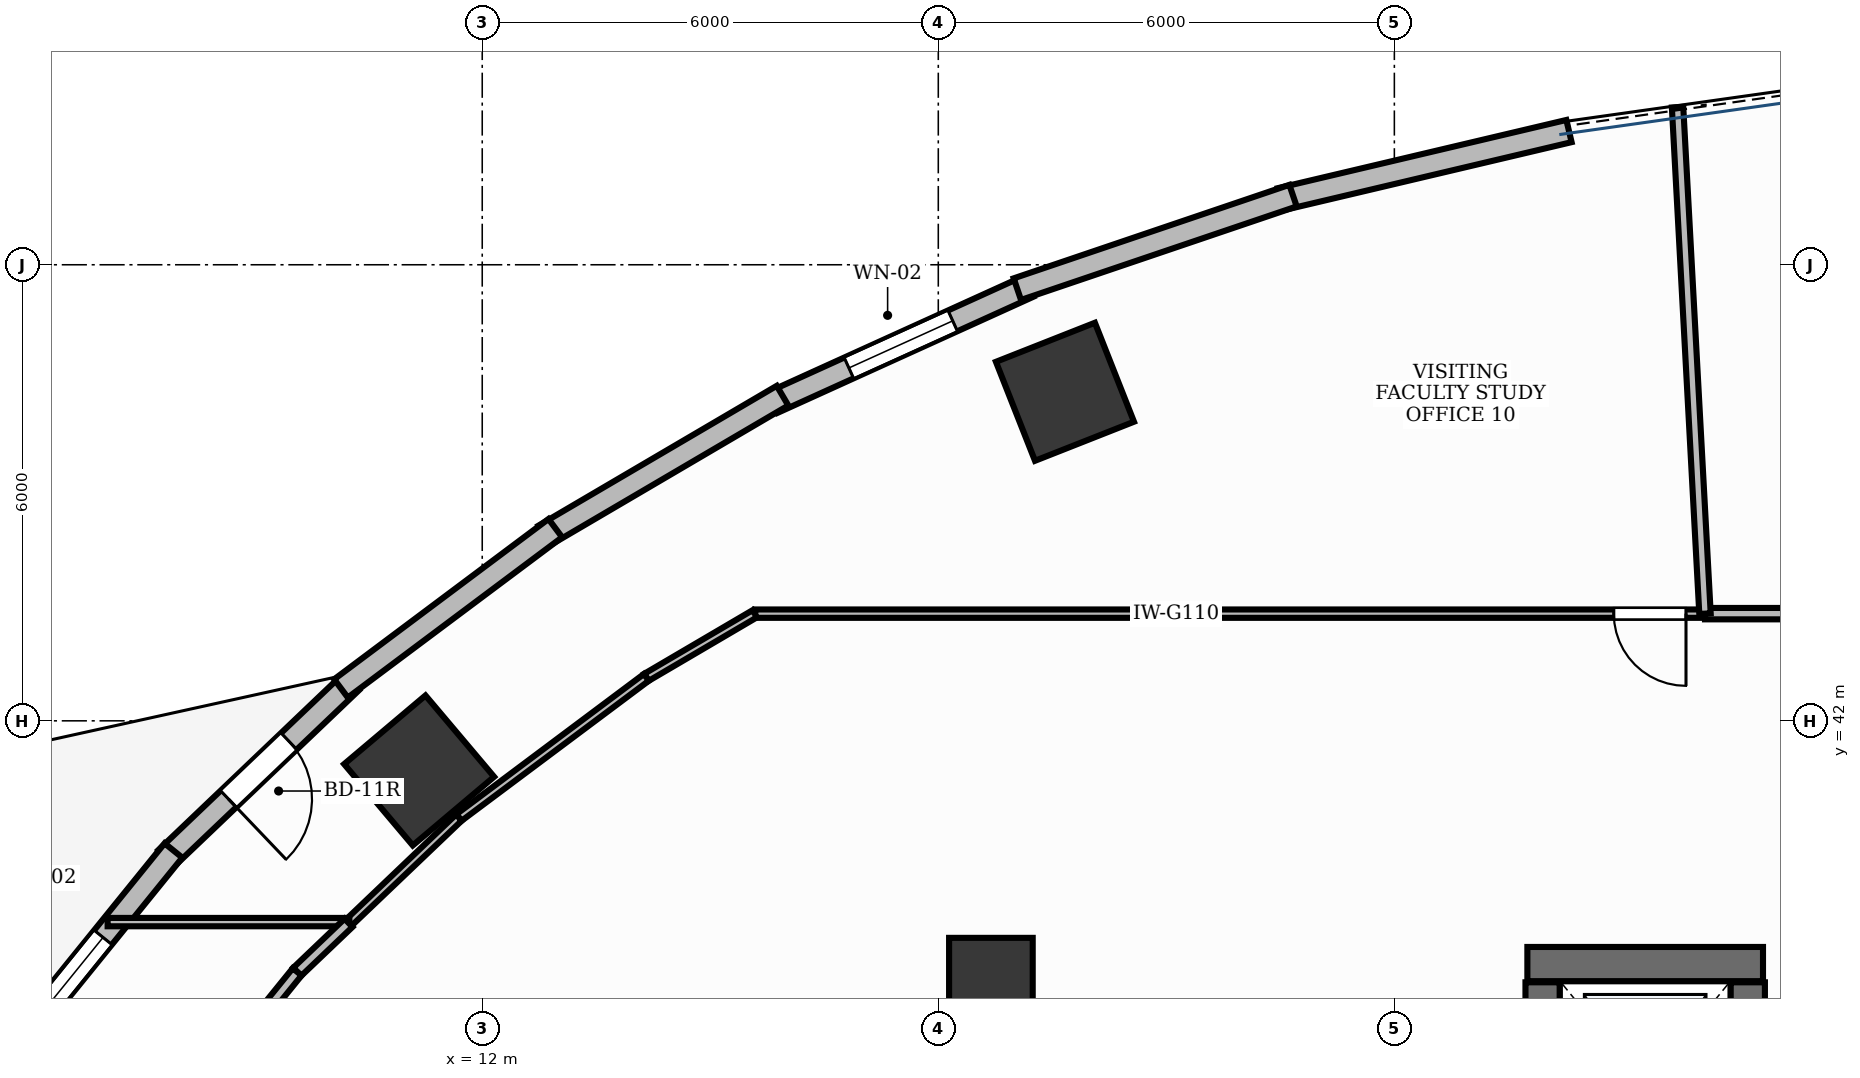
"""IFC4 building model, lengths in metres.
Left out: names, types, materials, properties, quantities, classifications, styles, units other than length and angle.
Written with IfcOpenShell. Run it as: python <this file> out.ifc"""

import sys

from ifc_helpers import new_model, si_unit, direction, frame, frame_2d, origin, origin_2d, place, context, subcontext, project, spatial, rectangle, extrude, element, fill, save


model = new_model("IFC4")
c1 = context("Model", 3, precision=1e-05, world=origin(), true_north=direction((0.0, 1.0)))
c2 = subcontext(c1, "Body", "Model", "MODEL_VIEW")
j1 = project(units=[si_unit("LENGTHUNIT", "METRE"), si_unit("PLANEANGLEUNIT", "RADIAN")], contexts=[c1])
p1 = place(None, origin())
s1 = spatial("IfcSite", under=j1, at=p1, CompositionType="ELEMENT")
p2 = place(p1, origin())
s2 = spatial("IfcBuilding", under=s1, at=p2, CompositionType="ELEMENT")
p3 = place(p2, frame((0.0, 0.0, 46.8)))
s3 = spatial("IfcBuildingStorey", under=s2, at=p3, CompositionType="ELEMENT", Elevation=46.8)
p4 = place(p3, frame((25.75, 38.8, 0.0), z_axis=(0.0, 0.0, 1.0), x_axis=(1.0, 0.0, 0.0)))
e1 = element("IfcWall", 1, at=p4, inside=s3, PredefinedType="SHEAR", context=c2, shape_type="SweptSolid", body=[
    extrude(rectangle(XDim=3.1, YDim=0.45, at=frame_2d((1.55, 0.0))), origin(), (0.0, 0.0, 1.0), 3.9),
])
for number, where, z_axis, x_axis in (
    (2, (25.95, 35.86, 0.0), (0.0, 0.0, 1.0), (0.0, 1.0, 0.0)),
    (3, (28.65, 35.86, 0.0), (0.0, 0.0, 1.0), (0.0, 1.0, 0.0)),
):
    element("IfcWall", number, at=place(p3, frame(where, z_axis=z_axis, x_axis=x_axis)), inside=s3, PredefinedType="SHEAR", context=c2, shape_type="SweptSolid", body=[
        extrude(rectangle(XDim=2.7, YDim=0.45, at=frame_2d((1.35, 0.0))), origin(), (0.0, 0.0, 1.0), 3.9),
    ])
for number, where, z_axis, x_axis in (
    (4, (19.667, 46.329, -0.0), (0.0, 0.0, 1.0), (0.93, 0.367, 0.0)),
    (5, (11.17, 41.347, -0.0), (0.0, 0.0, 1.0), (0.764, 0.645, 0.0)),
):
    element("IfcColumn", number, at=place(p3, frame(where, z_axis=z_axis, x_axis=x_axis)), inside=s3, PredefinedType="COLUMN", context=c2, shape_type="SweptSolid", body=[
        extrude(rectangle(XDim=1.4, YDim=1.4, at=origin_2d()), origin(), (0.0, 0.0, 1.0), 3.901),
    ])
p5 = place(p3, frame((18.692, 38.595, -0.0), z_axis=(0.0, 0.0, 1.0), x_axis=(1.0, 0.0, 0.0)))
e6 = element("IfcColumn", 6, at=p5, inside=s3, PredefinedType="COLUMN", context=c2, shape_type="SweptSolid", body=[
    extrude(rectangle(XDim=1.1, YDim=1.1, at=origin_2d()), origin(), (0.0, 0.0, 1.0), 3.901),
])
p6 = place(p3, frame((19.191, 47.717, 0.0), z_axis=(0.0, 0.0, 1.0), x_axis=(-0.910608120407, -0.413270917254, 0.0)))
e7 = element("IfcWall", 7, at=p6, inside=s3, PredefinedType="STANDARD", context=c2, shape_type="SweptSolid", body=[
    extrude(rectangle(XDim=3.7, YDim=0.3, at=frame_2d((1.85, 0.0))), origin(), (0.0, 0.0, 1.0), 3.9),
])
p7 = place(p6, frame((1.1, 0.0, 0.95)))
e8 = element("IfcOpeningElement", 8, at=p7, cuts=e7, PredefinedType="OPENING", context=c2, shape_type="SweptSolid", body=[
    extrude(rectangle(XDim=1.5, YDim=1.8, at=frame_2d((0.75, 0.9))), frame((0.0, 0.165, 0.0), z_axis=(0.0, -1.0, 0.0), x_axis=(1.0, 0.0, 0.0)), (0.0, 0.0, 1.0), 0.33),
])
p8 = place(p3, frame((10.276, 42.512, 0.0), z_axis=(0.0, 0.0, 1.0), x_axis=(-0.723678516117, -0.690137236578, 0.0)))
e9 = element("IfcWall", 9, at=p8, inside=s3, PredefinedType="STANDARD", context=c2, shape_type="SweptSolid", body=[
    extrude(rectangle(XDim=3.363, YDim=0.3, at=frame_2d((1.681, 0.0))), origin(), (0.0, 0.0, 1.0), 3.9),
])
p9 = place(p8, frame((1.131, 0.0, 0.0)))
e10 = element("IfcOpeningElement", 10, at=p9, cuts=e9, PredefinedType="OPENING", context=c2, shape_type="SweptSolid", body=[
    extrude(rectangle(XDim=1.1, YDim=2.15, at=frame_2d((0.55, 1.075))), frame((0.0, 0.165, 0.0), z_axis=(0.0, -1.0, 0.0), x_axis=(1.0, 0.0, 0.0)), (0.0, 0.0, 1.0), 0.33),
])
p10 = place(p3, frame((7.938, 40.294, 0.0), z_axis=(0.0, 0.0, 1.0), x_axis=(-0.629295540187, -0.777166084631, 0.0)))
e11 = element("IfcWall", 11, at=p10, inside=s3, PredefinedType="STANDARD", context=c2, shape_type="SweptSolid", body=[
    extrude(rectangle(XDim=3.248, YDim=0.3, at=frame_2d((1.624, 0.0))), origin(), (0.0, 0.0, 1.0), 3.9),
])
p11 = place(p10, frame((1.472, 0.0, 0.95)))
e12 = element("IfcOpeningElement", 12, at=p11, cuts=e11, PredefinedType="OPENING", context=c2, shape_type="SweptSolid", body=[
    extrude(rectangle(XDim=1.5, YDim=1.8, at=frame_2d((0.75, 0.9))), frame((0.0, 0.165, 0.0), z_axis=(0.0, -1.0, 0.0), x_axis=(1.0, 0.0, 0.0)), (0.0, 0.0, 1.0), 0.33),
])
p12 = place(p3, frame((26.297, 49.759, 0.0), z_axis=(0.0, 0.0, 1.0), x_axis=(-0.973197600754, -0.229970497863, 0.0)))
e13 = element("IfcWall", 13, at=p12, inside=s3, PredefinedType="STANDARD", context=c2, shape_type="SweptSolid", body=[
    extrude(rectangle(XDim=3.901, YDim=0.3, at=frame_2d((1.951, 0.0))), origin(), (0.0, 0.0, 1.0), 3.9),
])
p13 = place(p3, frame((22.667, 48.909, 0.0), z_axis=(0.0, 0.0, 1.0), x_axis=(-0.94702579403, -0.321157508773, 0.0)))
e14 = element("IfcWall", 14, at=p13, inside=s3, PredefinedType="STANDARD", context=c2, shape_type="SweptSolid", body=[
    extrude(rectangle(XDim=3.83, YDim=0.3, at=frame_2d((1.915, 0.0))), origin(), (0.0, 0.0, 1.0), 3.47),
])
p14 = place(p3, frame((15.951, 46.278, 0.0), z_axis=(0.0, 0.0, 1.0), x_axis=(-0.8624654944, -0.506115867139, 0.0)))
e15 = element("IfcWall", 15, at=p14, inside=s3, PredefinedType="STANDARD", context=c2, shape_type="SweptSolid", body=[
    extrude(rectangle(XDim=3.635, YDim=0.3, at=frame_2d((1.818, 0.0))), origin(), (0.0, 0.0, 1.0), 3.9),
])
p15 = place(p3, frame((12.961, 44.535, 0.0), z_axis=(0.0, 0.0, 1.0), x_axis=(-0.800823020995, -0.598901067827, 0.0)))
e16 = element("IfcWall", 16, at=p15, inside=s3, PredefinedType="STANDARD", context=c2, shape_type="SweptSolid", body=[
    extrude(rectangle(XDim=3.521, YDim=0.3, at=frame_2d((1.76, 0.0))), origin(), (0.0, 0.0, 1.0), 3.9),
])
p16 = place(p3, frame((35.238, 43.41, 0.0), z_axis=(0.0, 0.0, 1.0), x_axis=(-1.0, 0.0, 0.0)))
e17 = element("IfcWall", 17, at=p16, inside=s3, PredefinedType="PARTITIONING", context=c2, shape_type="SweptSolid", body=[
    extrude(rectangle(XDim=7.151, YDim=0.15, at=frame_2d((3.575, 0.0))), origin(), (0.0, 0.0, 1.0), 2.91),
])
p17 = place(p16, frame((0.24, 0.0, 0.0)))
e18 = element("IfcOpeningElement", 18, at=p17, cuts=e17, PredefinedType="OPENING", context=c2, shape_type="SweptSolid", body=[
    extrude(rectangle(XDim=0.95, YDim=2.15, at=frame_2d((0.475, 1.075))), frame((0.0, 0.09, 0.0), z_axis=(0.0, -1.0, 0.0), x_axis=(1.0, 0.0, 0.0)), (0.0, 0.0, 1.0), 0.18),
])
p18 = place(p3, frame((28.077, 43.41, 0.0), z_axis=(0.0, 0.0, 1.0), x_axis=(-1.0, 0.0, 0.0)))
e19 = element("IfcWall", 19, at=p18, inside=s3, PredefinedType="MOVABLE", context=c2, shape_type="SweptSolid", body=[
    extrude(rectangle(XDim=12.486, YDim=0.11, at=frame_2d((6.243, 0.0))), origin(), (0.0, 0.0, 1.0), 2.91),
])
p19 = place(p18, frame((0.24, 0.0, 0.0)))
e20 = element("IfcOpeningElement", 20, at=p19, cuts=e19, PredefinedType="OPENING", context=c2, shape_type="SweptSolid", body=[
    extrude(rectangle(XDim=0.95, YDim=2.15, at=frame_2d((0.475, 1.075))), frame((0.0, 0.07, 0.0), z_axis=(0.0, -1.0, 0.0), x_axis=(1.0, 0.0, 0.0)), (0.0, 0.0, 1.0), 0.14),
])
p20 = place(p3, frame((28.087, 43.41, 0.0), z_axis=(0.0, 0.0, 1.0), x_axis=(-0.054075825804, 0.998536832102, 0.0)))
e21 = element("IfcWall", 21, at=p20, inside=s3, PredefinedType="PARTITIONING", context=c2, shape_type="SweptSolid", body=[
    extrude(rectangle(XDim=6.673, YDim=0.15, at=frame_2d((3.336, 0.0))), origin(), (0.0, 0.0, 1.0), 2.91),
])
p21 = place(p3, frame((15.586, 43.409, 0.0), z_axis=(0.0, 0.0, 1.0), x_axis=(-0.862446636904, -0.506148000582, 0.0)))
e22 = element("IfcWall", 22, at=p21, inside=s3, PredefinedType="MOVABLE", context=c2, shape_type="SweptSolid", body=[
    extrude(rectangle(XDim=1.652, YDim=0.11, at=frame_2d((0.826, 0.0))), origin(), (0.0, 0.0, 1.0), 2.91),
])
p22 = place(p3, frame((14.16, 42.572, 0.0), z_axis=(0.0, 0.0, 1.0), x_axis=(-0.800808090092, -0.598921032227, 0.0)))
e23 = element("IfcWall", 23, at=p22, inside=s3, PredefinedType="MOVABLE", context=c2, shape_type="SweptSolid", body=[
    extrude(rectangle(XDim=3.079, YDim=0.11, at=frame_2d((1.54, 0.0))), origin(), (0.0, 0.0, 1.0), 2.91),
])
p23 = place(p3, frame((11.693, 40.727, 0.0), z_axis=(0.0, 0.0, 1.0), x_axis=(-0.723636479822, -0.690181313185, 0.0)))
e24 = element("IfcWall", 24, at=p23, inside=s3, PredefinedType="MOVABLE", context=c2, shape_type="SweptSolid", body=[
    extrude(rectangle(XDim=1.992, YDim=0.11, at=frame_2d((0.996, 0.0))), origin(), (0.0, 0.0, 1.0), 2.91),
])
p24 = place(p3, frame((10.252, 39.352, 0.0), z_axis=(0.0, 0.0, 1.0), x_axis=(-1.0, 0.0, 0.0)))
e25 = element("IfcWall", 25, at=p24, inside=s3, PredefinedType="MOVABLE", context=c2, shape_type="SweptSolid", body=[
    extrude(rectangle(XDim=3.18, YDim=0.11, at=frame_2d((1.59, 0.0))), origin(), (0.0, 0.0, 1.0), 2.91),
])
p25 = place(p3, frame((10.241, 39.342, 0.0), z_axis=(0.0, 0.0, 1.0), x_axis=(-0.723783132033, -0.690027519585, 0.0)))
e26 = element("IfcWall", 26, at=p25, inside=s3, PredefinedType="PARTITIONING", context=c2, shape_type="SweptSolid", body=[
    extrude(rectangle(XDim=0.933, YDim=0.15, at=frame_2d((0.467, 0.0))), origin(), (0.0, 0.0, 1.0), 2.91),
])
p26 = place(p3, frame((9.565, 38.697, 0.0), z_axis=(0.0, 0.0, 1.0), x_axis=(-0.629270515505, -0.777186347227, 0.0)))
e27 = element("IfcWall", 27, at=p26, inside=s3, PredefinedType="PARTITIONING", context=c2, shape_type="SweptSolid", body=[
    extrude(rectangle(XDim=2.817, YDim=0.15, at=frame_2d((1.409, 0.0))), origin(), (0.0, 0.0, 1.0), 2.91),
])
p27 = place(p7, origin())
e28 = element("IfcWindow", 28, at=p27, inside=s3, PartitioningType="DOUBLE_PANEL_VERTICAL", PredefinedType="WINDOW", context=c2, shape_type="SweptSolid", body=[
    extrude(rectangle(XDim=1.5, YDim=1.8, at=frame_2d((0.75, 0.9))), frame((0.0, 0.03, 0.0), z_axis=(0.0, -1.0, 0.0), x_axis=(1.0, 0.0, 0.0)), (0.0, 0.0, 1.0), 0.06),
])
fill(e8, e28)
p28 = place(p9, origin())
e29 = element("IfcDoor", 29, at=p28, inside=s3, OperationType="SINGLE_SWING_RIGHT", PredefinedType="DOOR", context=c2, shape_type="SweptSolid", body=[
    extrude(rectangle(XDim=1.1, YDim=2.15, at=frame_2d((0.55, 1.075))), frame((0.0, 0.025, 0.0), z_axis=(0.0, -1.0, 0.0), x_axis=(1.0, 0.0, 0.0)), (0.0, 0.0, 1.0), 0.05),
])
fill(e10, e29)
p29 = place(p11, origin())
e30 = element("IfcWindow", 30, at=p29, inside=s3, PartitioningType="DOUBLE_PANEL_VERTICAL", PredefinedType="WINDOW", context=c2, shape_type="SweptSolid", body=[
    extrude(rectangle(XDim=1.5, YDim=1.8, at=frame_2d((0.75, 0.9))), frame((0.0, 0.03, 0.0), z_axis=(0.0, -1.0, 0.0), x_axis=(1.0, 0.0, 0.0)), (0.0, 0.0, 1.0), 0.06),
])
fill(e12, e30)
p30 = place(p19, origin())
e31 = element("IfcDoor", 31, at=p30, inside=s3, OperationType="SINGLE_SWING_LEFT", PredefinedType="DOOR", context=c2, shape_type="SweptSolid", body=[
    extrude(rectangle(XDim=0.95, YDim=2.15, at=frame_2d((0.475, 1.075))), frame((0.0, 0.025, 0.0), z_axis=(0.0, -1.0, 0.0), x_axis=(1.0, 0.0, 0.0)), (0.0, 0.0, 1.0), 0.05),
])
fill(e20, e31)
save(model, sys.argv[1])
